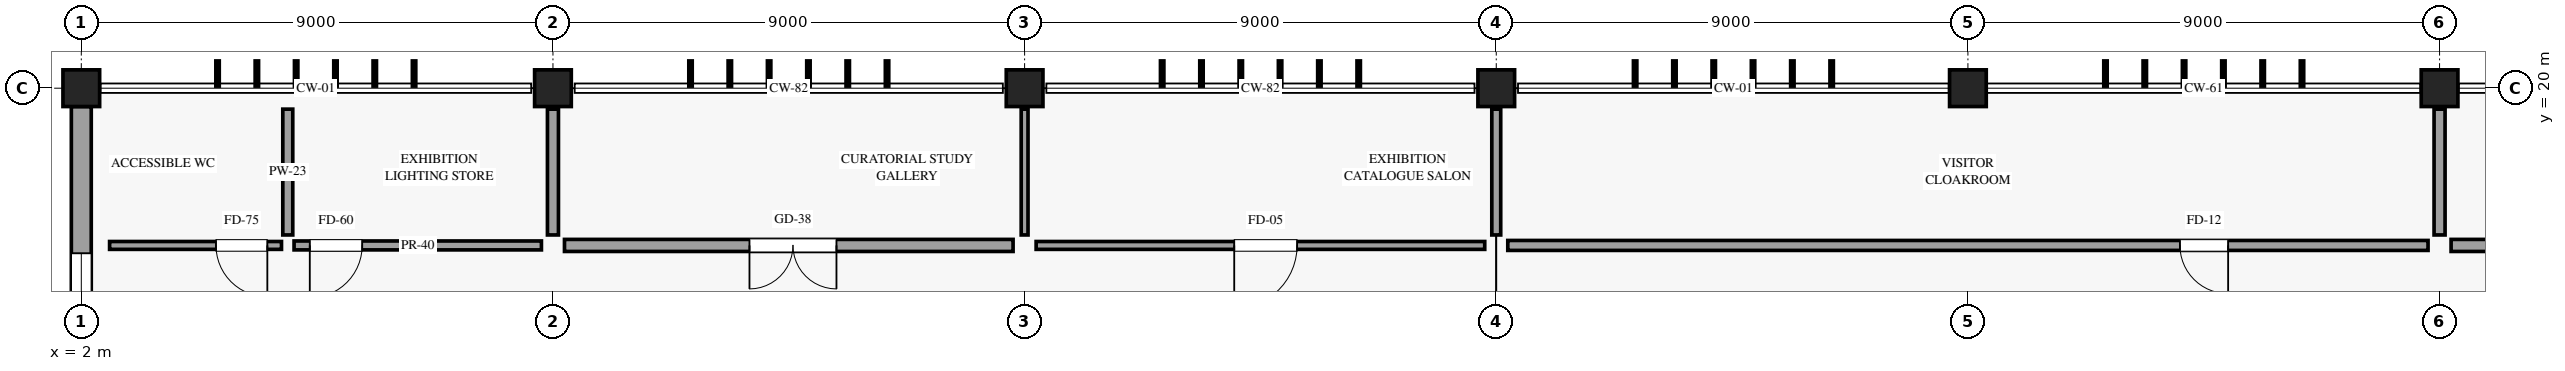
"""IFC4 building model, lengths in metres.
Left out: names, types, materials, properties, quantities, classifications, styles, units other than length and angle.
Written with IfcOpenShell. Run it as: python <this file> out.ifc"""

import sys

from ifc_helpers import new_model, si_unit, direction, frame, frame_2d, origin, origin_2d, place, context, subcontext, project, spatial, rectangle, extrude, element, fill, save


model = new_model("IFC4")
c1 = context("Model", 3, precision=1e-05, world=origin(), true_north=direction((0.0, 1.0)))
c2 = subcontext(c1, "Body", "Model", "MODEL_VIEW")
j1 = project(units=[si_unit("LENGTHUNIT", "METRE"), si_unit("PLANEANGLEUNIT", "RADIAN")], contexts=[c1])
p1 = place(None, origin())
s1 = spatial("IfcSite", under=j1, at=p1, CompositionType="ELEMENT")
p2 = place(p1, origin())
s2 = spatial("IfcBuilding", under=s1, at=p2, CompositionType="ELEMENT")
p3 = place(p2, frame((0.0, 0.0, 10.2)))
s3 = spatial("IfcBuildingStorey", under=s2, at=p3, CompositionType="ELEMENT", Elevation=10.2)
for number, where, z_axis, x_axis in (
    (1, (2.0, 20.0, 0.0), (0.0, 0.0, 1.0), (1.0, 0.0, 0.0)),
    (2, (11.0, 20.0, 0.0), (0.0, 0.0, 1.0), (1.0, 0.0, 0.0)),
    (3, (20.0, 20.0, 0.0), (0.0, 0.0, 1.0), (1.0, 0.0, 0.0)),
    (4, (29.0, 20.0, 0.0), (0.0, 0.0, 1.0), (1.0, 0.0, 0.0)),
    (5, (38.0, 20.0, 0.0), (0.0, 0.0, 1.0), (1.0, 0.0, 0.0)),
    (6, (47.0, 20.0, 0.0), (0.0, 0.0, 1.0), (1.0, 0.0, 0.0)),
):
    element("IfcColumn", number, at=place(p3, frame(where, z_axis=z_axis, x_axis=x_axis)), inside=s3, PredefinedType="COLUMN", context=c2, shape_type="SweptSolid", body=[
        extrude(rectangle(XDim=0.7, YDim=0.7, at=origin_2d()), origin(), (0.0, 0.0, 1.0), 4.8),
    ])
p4 = place(p3, frame((2.0, 11.35, 0.0), z_axis=(0.0, 0.0, 1.0), x_axis=(0.0, 1.0, 0.0)))
e7 = element("IfcWall", 7, at=p4, inside=s3, PredefinedType="STANDARD", context=c2, shape_type="SweptSolid", body=[
    extrude(rectangle(XDim=8.3, YDim=0.38, at=frame_2d((4.15, 0.0))), origin(), (0.0, 0.0, 1.0), 3.715),
])
p5 = place(p4, frame((2.8, 0.0, 0.85)))
e8 = element("IfcOpeningElement", 8, at=p5, cuts=e7, PredefinedType="OPENING", context=c2, shape_type="SweptSolid", body=[
    extrude(rectangle(XDim=2.7, YDim=2.2, at=frame_2d((1.35, 1.1))), frame((0.0, 0.2, 0.0), z_axis=(0.0, -1.0, 0.0), x_axis=(1.0, 0.0, 0.0)), (0.0, 0.0, 1.0), 0.4),
])
p6 = place(p3, frame((2.54, 17.0, 0.0), z_axis=(0.0, 0.0, 1.0), x_axis=(1.0, 0.0, 0.0)))
e9 = element("IfcWall", 9, at=p6, inside=s3, PredefinedType="PARTITIONING", context=c2, shape_type="SweptSolid", body=[
    extrude(rectangle(XDim=3.28, YDim=0.15, at=frame_2d((1.64, 0.0))), origin(), (0.0, 0.0, 1.0), 4.135),
])
p7 = place(p6, frame((3.01, 0.0, 0.0), z_axis=(0.0, 0.0, 1.0), x_axis=(-1.0, 0.0, 0.0)))
e10 = element("IfcOpeningElement", 10, at=p7, cuts=e9, PredefinedType="OPENING", context=c2, shape_type="SweptSolid", body=[
    extrude(rectangle(XDim=0.98, YDim=2.18, at=frame_2d((0.49, 1.09))), frame((0.0, 0.085, 0.0), z_axis=(0.0, -1.0, 0.0), x_axis=(1.0, 0.0, 0.0)), (0.0, 0.0, 1.0), 0.17),
])
p8 = place(p3, frame((6.06, 17.0, 0.0), z_axis=(0.0, 0.0, 1.0), x_axis=(1.0, 0.0, 0.0)))
e11 = element("IfcWall", 11, at=p8, inside=s3, PredefinedType="PARTITIONING", context=c2, shape_type="SweptSolid", body=[
    extrude(rectangle(XDim=4.72, YDim=0.17, at=frame_2d((2.36, 0.0))), origin(), (0.0, 0.0, 1.0), 3.715),
])
p9 = place(p8, frame((1.3, 0.0, 0.0), z_axis=(0.0, 0.0, 1.0), x_axis=(-1.0, 0.0, 0.0)))
e12 = element("IfcOpeningElement", 12, at=p9, cuts=e11, PredefinedType="OPENING", context=c2, shape_type="SweptSolid", body=[
    extrude(rectangle(XDim=1.0, YDim=2.2, at=frame_2d((0.5, 1.1))), frame((0.0, 0.095, 0.0), z_axis=(0.0, -1.0, 0.0), x_axis=(1.0, 0.0, 0.0)), (0.0, 0.0, 1.0), 0.19),
])
p10 = place(p3, frame((5.94, 17.2, 0.0), z_axis=(0.0, 0.0, 1.0), x_axis=(0.0, 1.0, 0.0)))
e13 = element("IfcWall", 13, at=p10, inside=s3, PredefinedType="PARTITIONING", context=c2, shape_type="SweptSolid", body=[
    extrude(rectangle(XDim=2.4, YDim=0.19, at=frame_2d((1.2, 0.0))), origin(), (0.0, 0.0, 1.0), 4.48),
])
p11 = place(p3, frame((11.0, 17.2, 0.0), z_axis=(0.0, 0.0, 1.0), x_axis=(0.0, 1.0, 0.0)))
e14 = element("IfcWall", 14, at=p11, inside=s3, PredefinedType="PARTITIONING", context=c2, shape_type="SweptSolid", body=[
    extrude(rectangle(XDim=2.4, YDim=0.21, at=frame_2d((1.2, 0.0))), origin(), (0.0, 0.0, 1.0), 3.715),
])
p12 = place(p3, frame((11.22, 17.0, 0.0), z_axis=(0.0, 0.0, 1.0), x_axis=(1.0, 0.0, 0.0)))
e15 = element("IfcWall", 15, at=p12, inside=s3, PredefinedType="PARTITIONING", context=c2, shape_type="SweptSolid", body=[
    extrude(rectangle(XDim=8.56, YDim=0.23, at=frame_2d((4.28, 0.0))), origin(), (0.0, 0.0, 1.0), 3.715),
])
p13 = place(p12, frame((5.19, 0.0, 0.0), z_axis=(0.0, 0.0, 1.0), x_axis=(-1.0, 0.0, 0.0)))
e16 = element("IfcOpeningElement", 16, at=p13, cuts=e15, PredefinedType="OPENING", context=c2, shape_type="SweptSolid", body=[
    extrude(rectangle(XDim=1.66, YDim=2.42, at=frame_2d((0.83, 1.21))), frame((0.0, 0.125, 0.0), z_axis=(0.0, -1.0, 0.0), x_axis=(1.0, 0.0, 0.0)), (0.0, 0.0, 1.0), 0.25),
])
p14 = place(p3, frame((20.0, 17.2, 0.0), z_axis=(0.0, 0.0, 1.0), x_axis=(0.0, 1.0, 0.0)))
e17 = element("IfcWall", 17, at=p14, inside=s3, PredefinedType="PARTITIONING", context=c2, shape_type="SweptSolid", body=[
    extrude(rectangle(XDim=2.4, YDim=0.13, at=frame_2d((1.2, 0.0))), origin(), (0.0, 0.0, 1.0), 3.715),
])
p15 = place(p3, frame((20.22, 17.0, 0.0), z_axis=(0.0, 0.0, 1.0), x_axis=(1.0, 0.0, 0.0)))
e18 = element("IfcWall", 18, at=p15, inside=s3, PredefinedType="PARTITIONING", context=c2, shape_type="SweptSolid", body=[
    extrude(rectangle(XDim=8.56, YDim=0.15, at=frame_2d((4.28, 0.0))), origin(), (0.0, 0.0, 1.0), 3.715),
])
p16 = place(p15, frame((4.98, 0.0, 0.0), z_axis=(0.0, 0.0, 1.0), x_axis=(-1.0, 0.0, 0.0)))
e19 = element("IfcOpeningElement", 19, at=p16, cuts=e18, PredefinedType="OPENING", context=c2, shape_type="SweptSolid", body=[
    extrude(rectangle(XDim=1.2, YDim=2.3, at=frame_2d((0.6, 1.15))), frame((0.0, 0.085, 0.0), z_axis=(0.0, -1.0, 0.0), x_axis=(1.0, 0.0, 0.0)), (0.0, 0.0, 1.0), 0.17),
])
p17 = place(p3, frame((29.0, 17.2, 0.0), z_axis=(0.0, 0.0, 1.0), x_axis=(0.0, 1.0, 0.0)))
e20 = element("IfcWall", 20, at=p17, inside=s3, PredefinedType="PARTITIONING", context=c2, shape_type="SweptSolid", body=[
    extrude(rectangle(XDim=2.4, YDim=0.17, at=frame_2d((1.2, 0.0))), origin(), (0.0, 0.0, 1.0), 3.715),
])
p18 = place(p3, frame((29.22, 17.0, 0.0), z_axis=(0.0, 0.0, 1.0), x_axis=(1.0, 0.0, 0.0)))
e21 = element("IfcWall", 21, at=p18, inside=s3, PredefinedType="PARTITIONING", context=c2, shape_type="SweptSolid", body=[
    extrude(rectangle(XDim=17.56, YDim=0.19, at=frame_2d((8.78, 0.0))), origin(), (0.0, 0.0, 1.0), 3.715),
])
p19 = place(p18, frame((13.746, 0.0, 0.0), z_axis=(0.0, 0.0, 1.0), x_axis=(-1.0, 0.0, 0.0)))
e22 = element("IfcOpeningElement", 22, at=p19, cuts=e21, PredefinedType="OPENING", context=c2, shape_type="SweptSolid", body=[
    extrude(rectangle(XDim=0.92, YDim=2.12, at=frame_2d((0.46, 1.06))), frame((0.0, 0.105, 0.0), z_axis=(0.0, -1.0, 0.0), x_axis=(1.0, 0.0, 0.0)), (0.0, 0.0, 1.0), 0.21),
])
p20 = place(p3, frame((47.0, 17.2, 0.0), z_axis=(0.0, 0.0, 1.0), x_axis=(0.0, 1.0, 0.0)))
e23 = element("IfcWall", 23, at=p20, inside=s3, PredefinedType="PARTITIONING", context=c2, shape_type="SweptSolid", body=[
    extrude(rectangle(XDim=2.4, YDim=0.21, at=frame_2d((1.2, 0.0))), origin(), (0.0, 0.0, 1.0), 3.715),
])
p21 = place(p3, frame((47.22, 17.0, 0.0), z_axis=(0.0, 0.0, 1.0), x_axis=(1.0, 0.0, 0.0)))
e24 = element("IfcWall", 24, at=p21, inside=s3, PredefinedType="PARTITIONING", context=c2, shape_type="SweptSolid", body=[
    extrude(rectangle(XDim=8.56, YDim=0.23, at=frame_2d((4.28, 0.0))), origin(), (0.0, 0.0, 1.0), 3.715),
])
p22 = place(p21, frame((5.03, 0.0, 0.0), z_axis=(0.0, 0.0, 1.0), x_axis=(-1.0, 0.0, 0.0)))
e25 = element("IfcOpeningElement", 25, at=p22, cuts=e24, PredefinedType="OPENING", context=c2, shape_type="SweptSolid", body=[
    extrude(rectangle(XDim=1.5, YDim=2.35, at=frame_2d((0.75, 1.175))), frame((0.0, 0.125, 0.0), z_axis=(0.0, -1.0, 0.0), x_axis=(1.0, 0.0, 0.0)), (0.0, 0.0, 1.0), 0.25),
])
p23 = place(p5, origin())
e26 = element("IfcWindow", 26, at=p23, inside=s3, PartitioningType="SINGLE_PANEL", PredefinedType="WINDOW", context=c2, shape_type="SweptSolid", body=[
    extrude(rectangle(XDim=2.7, YDim=2.2, at=frame_2d((1.35, 1.1))), frame((0.0, 0.03, 0.0), z_axis=(0.0, -1.0, 0.0), x_axis=(1.0, 0.0, 0.0)), (0.0, 0.0, 1.0), 0.06),
])
fill(e8, e26)
p24 = place(p7, origin())
e27 = element("IfcDoor", 27, at=p24, inside=s3, OperationType="SINGLE_SWING_LEFT", PredefinedType="DOOR", context=c2, shape_type="SweptSolid", body=[
    extrude(rectangle(XDim=0.98, YDim=2.18, at=frame_2d((0.49, 1.09))), frame((0.0, 0.025, 0.0), z_axis=(0.0, -1.0, 0.0), x_axis=(1.0, 0.0, 0.0)), (0.0, 0.0, 1.0), 0.05),
])
fill(e10, e27)
p25 = place(p9, origin())
e28 = element("IfcDoor", 28, at=p25, inside=s3, OperationType="SINGLE_SWING_RIGHT", PredefinedType="DOOR", context=c2, shape_type="SweptSolid", body=[
    extrude(rectangle(XDim=1.0, YDim=2.2, at=frame_2d((0.5, 1.1))), frame((0.0, 0.025, 0.0), z_axis=(0.0, -1.0, 0.0), x_axis=(1.0, 0.0, 0.0)), (0.0, 0.0, 1.0), 0.05),
])
fill(e12, e28)
p26 = place(p13, origin())
e29 = element("IfcDoor", 29, at=p26, inside=s3, OperationType="DOUBLE_DOOR_SINGLE_SWING", PredefinedType="DOOR", context=c2, shape_type="SweptSolid", body=[
    extrude(rectangle(XDim=1.66, YDim=2.42, at=frame_2d((0.83, 1.21))), frame((0.0, 0.025, 0.0), z_axis=(0.0, -1.0, 0.0), x_axis=(1.0, 0.0, 0.0)), (0.0, 0.0, 1.0), 0.05),
])
fill(e16, e29)
p27 = place(p16, origin())
e30 = element("IfcDoor", 30, at=p27, inside=s3, OperationType="SINGLE_SWING_RIGHT", PredefinedType="DOOR", context=c2, shape_type="SweptSolid", body=[
    extrude(rectangle(XDim=1.2, YDim=2.3, at=frame_2d((0.6, 1.15))), frame((0.0, 0.025, 0.0), z_axis=(0.0, -1.0, 0.0), x_axis=(1.0, 0.0, 0.0)), (0.0, 0.0, 1.0), 0.05),
])
fill(e19, e30)
p28 = place(p19, origin())
e31 = element("IfcDoor", 31, at=p28, inside=s3, OperationType="SINGLE_SWING_LEFT", PredefinedType="DOOR", context=c2, shape_type="SweptSolid", body=[
    extrude(rectangle(XDim=0.92, YDim=2.12, at=frame_2d((0.46, 1.06))), frame((0.0, 0.025, 0.0), z_axis=(0.0, -1.0, 0.0), x_axis=(1.0, 0.0, 0.0)), (0.0, 0.0, 1.0), 0.05),
])
fill(e22, e31)
save(model, sys.argv[1])
